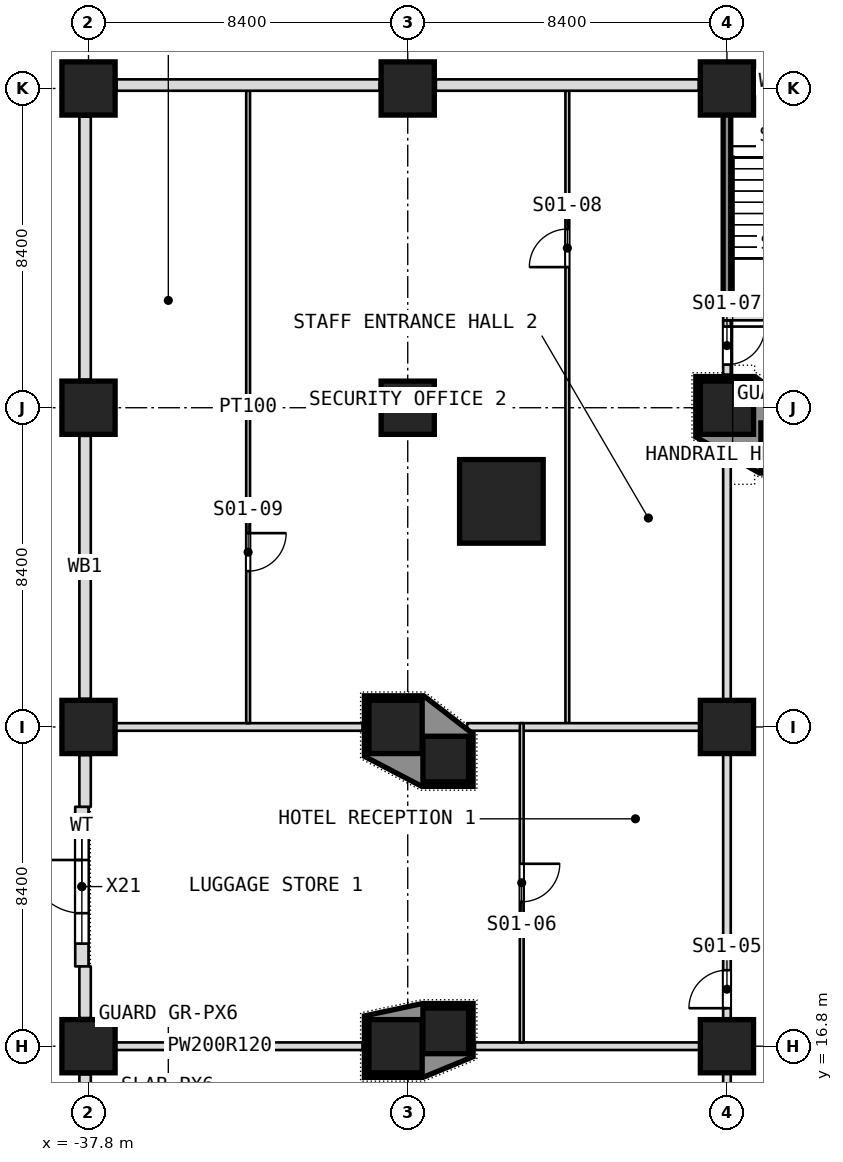
"""IFC4 building model, lengths in metres.
Left out: names, types, materials, properties, quantities, classifications, styles, units other than length and angle.
Written with IfcOpenShell. Run it as: python <this file> out.ifc"""

import sys

from ifc_helpers import new_model, si_unit, direction, frame, frame_2d, origin, origin_2d, place, context, subcontext, project, spatial, polyline, rectangle, outline, extrude, element, fill, save


model = new_model("IFC4")
c1 = context("Model", 3, precision=1e-05, world=origin(), true_north=direction((0.0, 1.0)))
c2 = subcontext(c1, "Body", "Model", "MODEL_VIEW")
j1 = project(units=[si_unit("LENGTHUNIT", "METRE"), si_unit("PLANEANGLEUNIT", "RADIAN")], contexts=[c1])
p1 = place(None, origin())
s1 = spatial("IfcSite", under=j1, at=p1, CompositionType="ELEMENT")
p2 = place(p1, origin())
s2 = spatial("IfcBuilding", under=s1, at=p2, CompositionType="ELEMENT")
p3 = place(p2, origin())
s3 = spatial("IfcBuildingStorey", under=s2, at=p3, CompositionType="ELEMENT", Elevation=0.0)
for number, where, z_axis, x_axis in (
    (1, (-37.8, 16.8, -0.3), (0.0, 0.0, 1.0), (1.0, 0.0, 0.0)),
    (2, (-29.72, 16.8, -0.3), (0.0, 0.0, 1.0), (1.0, 0.0, 0.0)),
    (3, (-21.0, 16.8, -0.3), (0.0, 0.0, 1.0), (1.0, 0.0, 0.0)),
    (4, (-37.8, 25.2, -0.3), (0.0, 0.0, 1.0), (1.0, 0.0, 0.0)),
    (5, (-29.72, 25.2, -0.3), (0.0, 0.0, 1.0), (1.0, 0.0, 0.0)),
    (6, (-21.0, 25.2, -0.3), (0.0, 0.0, 1.0), (1.0, 0.0, 0.0)),
    (7, (-37.8, 33.6, -0.3), (0.0, 0.0, 1.0), (1.0, 0.0, 0.0)),
    (8, (-29.4, 33.6, -0.3), (0.0, 0.0, 1.0), (1.0, 0.0, 0.0)),
    (9, (-21.0, 33.6, -0.3), (0.0, 0.0, 1.0), (1.0, 0.0, 0.0)),
    (10, (-37.8, 42.0, -0.3), (0.0, 0.0, 1.0), (1.0, 0.0, 0.0)),
    (11, (-29.4, 42.0, -0.3), (0.0, 0.0, 1.0), (1.0, 0.0, 0.0)),
    (12, (-21.0, 42.0, -0.3), (0.0, 0.0, 1.0), (1.0, 0.0, 0.0)),
):
    element("IfcColumn", number, at=place(p3, frame(where, z_axis=z_axis, x_axis=x_axis)), inside=s3, PredefinedType="COLUMN", context=c2, shape_type="SweptSolid", body=[
        extrude(rectangle(XDim=1.4, YDim=1.4, at=origin_2d()), origin(), (0.0, 0.0, 1.0), 8.3),
    ])
p4 = place(p3, frame((-26.936, 31.135, -0.3), z_axis=(0.0, 0.0, 1.0), x_axis=(1.0, 0.0, 0.0)))
e13 = element("IfcColumn", 13, at=p4, inside=s3, PredefinedType="COLUMN", context=c2, shape_type="SweptSolid", body=[
    extrude(rectangle(XDim=2.2, YDim=2.2, at=origin_2d()), origin(), (0.0, 0.0, 1.0), 8.3),
])
for number, where, z_axis, x_axis in (
    (14, (-28.4, 17.203, -0.3), (0.0, 0.0, 1.0), (1.0, 0.0, 0.0)),
    (15, (-28.4, 24.356, -0.3), (0.0, 0.0, 1.0), (1.0, 0.0, 0.0)),
    (16, (-19.507, 32.6, -0.3), (0.0, 0.0, 1.0), (1.0, 0.0, 0.0)),
):
    element("IfcColumn", number, at=place(p3, frame(where, z_axis=z_axis, x_axis=x_axis)), inside=s3, PredefinedType="COLUMN", context=c2, shape_type="SweptSolid", body=[
        extrude(rectangle(XDim=1.2, YDim=1.2, at=origin_2d()), origin(), (0.0, 0.0, 1.0), 8.3),
    ])
p5 = place(p3, frame((-38.1, 16.8, 0.0), z_axis=(0.0, 0.0, 1.0), x_axis=(1.0, 0.0, 0.0)))
e17 = element("IfcWall", 17, at=p5, inside=s3, PredefinedType="PARTITIONING", context=c2, shape_type="SweptSolid", body=[
    extrude(rectangle(XDim=7.51, YDim=0.2, at=frame_2d((3.755, 0.0))), origin(), (0.0, 0.0, 1.0), 7.68),
])
p6 = place(p3, frame((-27.63, 16.8, 0.0), z_axis=(0.0, 0.0, 1.0), x_axis=(1.0, 0.0, 0.0)))
e18 = element("IfcWall", 18, at=p6, inside=s3, PredefinedType="PARTITIONING", context=c2, shape_type="SweptSolid", body=[
    extrude(rectangle(XDim=6.53, YDim=0.2, at=frame_2d((3.265, 0.0))), origin(), (0.0, 0.0, 1.0), 7.68),
])
p7 = place(p3, frame((-21.0, 9.5, 0.0), z_axis=(0.0, 0.0, 1.0), x_axis=(0.0, 1.0, 0.0)))
e19 = element("IfcWall", 19, at=p7, inside=s3, PredefinedType="PARTITIONING", context=c2, shape_type="SweptSolid", body=[
    extrude(rectangle(XDim=22.788, YDim=0.2, at=frame_2d((11.394, 0.0))), origin(), (0.0, 0.0, 1.0), 7.68),
])
p8 = place(p7, frame((8.3, 0.0, 0.0)))
e20 = element("IfcOpeningElement", 20, at=p8, cuts=e19, PredefinedType="OPENING", context=c2, shape_type="SweptSolid", body=[
    extrude(rectangle(XDim=1.0, YDim=2.1, at=frame_2d((0.5, 1.05))), frame((0.0, 0.1, 0.0), z_axis=(0.0, -1.0, 0.0), x_axis=(1.0, 0.0, 0.0)), (0.0, 0.0, 1.0), 0.2),
])
p9 = place(p3, frame((-21.0, 34.47, 0.0), z_axis=(0.0, 0.0, 1.0), x_axis=(0.0, 1.0, 0.0)))
e21 = element("IfcWall", 21, at=p9, inside=s3, PredefinedType="PARTITIONING", context=c2, shape_type="SweptSolid", body=[
    extrude(rectangle(XDim=1.43, YDim=0.2, at=frame_2d((0.715, 0.0))), origin(), (0.0, 0.0, 1.0), 7.68),
])
p10 = place(p9, frame((0.265, 0.0, 0.0)))
e22 = element("IfcOpeningElement", 22, at=p10, cuts=e21, PredefinedType="OPENING", context=c2, shape_type="SweptSolid", body=[
    extrude(rectangle(XDim=1.0, YDim=2.1, at=frame_2d((0.5, 1.05))), frame((0.0, 0.1, 0.0), z_axis=(0.0, -1.0, 0.0), x_axis=(1.0, 0.0, 0.0)), (0.0, 0.0, 1.0), 0.2),
])
p11 = place(p3, frame((-21.0, 36.1, 0.0), z_axis=(0.0, 0.0, 1.0), x_axis=(0.0, 1.0, 0.0)))
e23 = element("IfcWall", 23, at=p11, inside=s3, PredefinedType="PARTITIONING", context=c2, shape_type="SweptSolid", body=[
    extrude(rectangle(XDim=6.2, YDim=0.2, at=frame_2d((3.1, 0.0))), origin(), (0.0, 0.0, 1.0), 7.68),
])
p12 = place(p3, frame((-25.2, 25.3, 0.0), z_axis=(0.0, 0.0, 1.0), x_axis=(0.0, 1.0, 0.0)))
e24 = element("IfcWall", 24, at=p12, inside=s3, PredefinedType="PARTITIONING", context=c2, shape_type="SweptSolid", body=[
    extrude(rectangle(XDim=16.64, YDim=0.1, at=frame_2d((8.32, 0.0))), origin(), (0.0, 0.0, 1.0), 7.68),
])
p13 = place(p12, frame((12.0, 0.0, 0.0)))
e25 = element("IfcOpeningElement", 25, at=p13, cuts=e24, PredefinedType="OPENING", context=c2, shape_type="SweptSolid", body=[
    extrude(rectangle(XDim=1.0, YDim=2.1, at=frame_2d((0.5, 1.05))), frame((0.0, 0.05, 0.0), z_axis=(0.0, -1.0, 0.0), x_axis=(1.0, 0.0, 0.0)), (0.0, 0.0, 1.0), 0.1),
])
p14 = place(p3, frame((-38.1, 25.2, 0.0), z_axis=(0.0, 0.0, 1.0), x_axis=(1.0, 0.0, 0.0)))
e26 = element("IfcWall", 26, at=p14, inside=s3, PredefinedType="PARTITIONING", context=c2, shape_type="SweptSolid", body=[
    extrude(rectangle(XDim=7.51, YDim=0.2, at=frame_2d((3.755, 0.0))), origin(), (0.0, 0.0, 1.0), 7.68),
])
p15 = place(p3, frame((-27.837, 25.2, 0.0), z_axis=(0.0, 0.0, 1.0), x_axis=(1.0, 0.0, 0.0)))
e27 = element("IfcWall", 27, at=p15, inside=s3, PredefinedType="PARTITIONING", context=c2, shape_type="SweptSolid", body=[
    extrude(rectangle(XDim=6.737, YDim=0.2, at=frame_2d((3.368, 0.0))), origin(), (0.0, 0.0, 1.0), 7.68),
])
p16 = place(p3, frame((-26.4, 16.9, 0.0), z_axis=(0.0, 0.0, 1.0), x_axis=(0.0, 1.0, 0.0)))
e28 = element("IfcWall", 28, at=p16, inside=s3, PredefinedType="PARTITIONING", context=c2, shape_type="SweptSolid", body=[
    extrude(rectangle(XDim=8.4, YDim=0.1, at=frame_2d((4.2, 0.0))), origin(), (0.0, 0.0, 1.0), 7.68),
])
p17 = place(p16, frame((3.7, 0.0, 0.0)))
e29 = element("IfcOpeningElement", 29, at=p17, cuts=e28, PredefinedType="OPENING", context=c2, shape_type="SweptSolid", body=[
    extrude(rectangle(XDim=1.0, YDim=2.1, at=frame_2d((0.5, 1.05))), frame((0.0, 0.05, 0.0), z_axis=(0.0, -1.0, 0.0), x_axis=(1.0, 0.0, 0.0)), (0.0, 0.0, 1.0), 0.1),
])
p18 = place(p3, frame((-33.6, 25.3, 0.0), z_axis=(0.0, 0.0, 1.0), x_axis=(0.0, 1.0, 0.0)))
e30 = element("IfcWall", 30, at=p18, inside=s3, PredefinedType="PARTITIONING", context=c2, shape_type="SweptSolid", body=[
    extrude(rectangle(XDim=16.64, YDim=0.1, at=frame_2d((8.32, 0.0))), origin(), (0.0, 0.0, 1.0), 7.68),
])
p19 = place(p18, frame((4.0, 0.0, 0.0)))
e31 = element("IfcOpeningElement", 31, at=p19, cuts=e30, PredefinedType="OPENING", context=c2, shape_type="SweptSolid", body=[
    extrude(rectangle(XDim=1.0, YDim=2.1, at=frame_2d((0.5, 1.05))), frame((0.0, 0.05, 0.0), z_axis=(0.0, -1.0, 0.0), x_axis=(1.0, 0.0, 0.0)), (0.0, 0.0, 1.0), 0.1),
])
p20 = place(p3, frame((-21.1, 36.0, 0.0), z_axis=(0.0, 0.0, 1.0), x_axis=(1.0, 0.0, 0.0)))
e32 = element("IfcWall", 32, at=p20, inside=s3, PredefinedType="PARTITIONING", context=c2, shape_type="SweptSolid", body=[
    extrude(rectangle(XDim=23.3, YDim=0.2, at=frame_2d((11.65, 0.0))), origin(), (0.0, 0.0, 1.0), 7.68),
])
p21 = place(p20, frame((1.6, 0.0, 0.0)))
e33 = element("IfcOpeningElement", 33, at=p21, cuts=e32, PredefinedType="OPENING", context=c2, shape_type="SweptSolid", body=[
    extrude(rectangle(XDim=1.2, YDim=2.1, at=frame_2d((0.6, 1.05))), frame((0.0, 0.1, 0.0), z_axis=(0.0, -1.0, 0.0), x_axis=(1.0, 0.0, 0.0)), (0.0, 0.0, 1.0), 0.2),
])
p22 = place(p20, frame((6.0, 0.0, 0.0)))
e34 = element("IfcOpeningElement", 34, at=p22, cuts=e32, PredefinedType="OPENING", context=c2, shape_type="SweptSolid", body=[
    extrude(rectangle(XDim=1.0, YDim=2.1, at=frame_2d((0.5, 1.05))), frame((0.0, 0.1, 0.0), z_axis=(0.0, -1.0, 0.0), x_axis=(1.0, 0.0, 0.0)), (0.0, 0.0, 1.0), 0.2),
])
p23 = place(p20, frame((13.15, 0.0, 0.0)))
e35 = element("IfcOpeningElement", 35, at=p23, cuts=e32, PredefinedType="OPENING", context=c2, shape_type="SweptSolid", body=[
    extrude(rectangle(XDim=1.0, YDim=2.1, at=frame_2d((0.5, 1.05))), frame((0.0, 0.1, 0.0), z_axis=(0.0, -1.0, 0.0), x_axis=(1.0, 0.0, 0.0)), (0.0, 0.0, 1.0), 0.2),
])
p24 = place(p20, frame((20.5, 0.0, 0.0)))
e36 = element("IfcOpeningElement", 36, at=p24, cuts=e32, PredefinedType="OPENING", context=c2, shape_type="SweptSolid", body=[
    extrude(rectangle(XDim=1.2, YDim=2.1, at=frame_2d((0.6, 1.05))), frame((0.0, 0.1, 0.0), z_axis=(0.0, -1.0, 0.0), x_axis=(1.0, 0.0, 0.0)), (0.0, 0.0, 1.0), 0.2),
])
p25 = place(p3, frame((-16.0, 42.175, 0.0), z_axis=(0.0, 0.0, 1.0), x_axis=(-1.0, 0.0, 0.0)))
e37 = element("IfcWall", 37, at=p25, inside=s3, PredefinedType="NOTDEFINED", context=c2, shape_type="SweptSolid", body=[
    extrude(rectangle(XDim=4.2, YDim=0.35, at=frame_2d((2.1, 0.0))), origin(), (0.0, 0.0, 1.0), 6.78),
])
p26 = place(p25, frame((1.4, 0.0, 0.0)))
e38 = element("IfcOpeningElement", 38, at=p26, cuts=e37, PredefinedType="OPENING", context=c2, shape_type="SweptSolid", body=[
    extrude(rectangle(XDim=1.4, YDim=2.2, at=frame_2d((0.7, 1.1))), frame((0.0, 0.175, 0.0), z_axis=(0.0, -1.0, 0.0), x_axis=(1.0, 0.0, 0.0)), (0.0, 0.0, 1.0), 0.35),
])
p27 = place(p25, frame((0.6, 0.0, 2.9)))
e39 = element("IfcOpeningElement", 39, at=p27, cuts=e37, PredefinedType="OPENING", context=c2, shape_type="SweptSolid", body=[
    extrude(rectangle(XDim=3.0, YDim=2.6, at=frame_2d((1.5, 1.3))), frame((0.0, 0.175, 0.0), z_axis=(0.0, -1.0, 0.0), x_axis=(1.0, 0.0, 0.0)), (0.0, 0.0, 1.0), 0.35),
])
p28 = place(p3, frame((-21.74, 42.09, 0.0), z_axis=(0.0, 0.0, 1.0), x_axis=(-1.0, 0.0, 0.0)))
e40 = element("IfcWall", 40, at=p28, inside=s3, PredefinedType="NOTDEFINED", context=c2, shape_type="SweptSolid", body=[
    extrude(rectangle(XDim=6.92, YDim=0.3, at=frame_2d((3.46, 0.0))), origin(), (0.0, 0.0, 1.0), 6.78),
])
p29 = place(p3, frame((-30.14, 42.09, 0.0), z_axis=(0.0, 0.0, 1.0), x_axis=(-1.0, 0.0, 0.0)))
e41 = element("IfcWall", 41, at=p29, inside=s3, PredefinedType="NOTDEFINED", context=c2, shape_type="SweptSolid", body=[
    extrude(rectangle(XDim=6.92, YDim=0.3, at=frame_2d((3.46, 0.0))), origin(), (0.0, 0.0, 1.0), 6.78),
])
p30 = place(p3, frame((-37.975, 23.1, 0.0), z_axis=(0.0, 0.0, 1.0), x_axis=(0.0, -1.0, 0.0)))
e42 = element("IfcWall", 42, at=p30, inside=s3, PredefinedType="NOTDEFINED", context=c2, shape_type="SweptSolid", body=[
    extrude(rectangle(XDim=4.2, YDim=0.35, at=frame_2d((2.1, 0.0))), origin(), (0.0, 0.0, 1.0), 6.78),
])
p31 = place(p30, frame((1.4, 0.0, 0.0)))
e43 = element("IfcOpeningElement", 43, at=p31, cuts=e42, PredefinedType="OPENING", context=c2, shape_type="SweptSolid", body=[
    extrude(rectangle(XDim=1.4, YDim=2.2, at=frame_2d((0.7, 1.1))), frame((0.0, 0.175, 0.0), z_axis=(0.0, -1.0, 0.0), x_axis=(1.0, 0.0, 0.0)), (0.0, 0.0, 1.0), 0.35),
])
p32 = place(p30, frame((0.6, 0.0, 2.9)))
e44 = element("IfcOpeningElement", 44, at=p32, cuts=e42, PredefinedType="OPENING", context=c2, shape_type="SweptSolid", body=[
    extrude(rectangle(XDim=3.0, YDim=2.6, at=frame_2d((1.5, 1.3))), frame((0.0, 0.175, 0.0), z_axis=(0.0, -1.0, 0.0), x_axis=(1.0, 0.0, 0.0)), (0.0, 0.0, 1.0), 0.35),
])
p33 = place(p3, frame((-37.89, 41.26, 0.0), z_axis=(0.0, 0.0, 1.0), x_axis=(0.0, -1.0, 0.0)))
e45 = element("IfcWall", 45, at=p33, inside=s3, PredefinedType="NOTDEFINED", context=c2, shape_type="SweptSolid", body=[
    extrude(rectangle(XDim=6.92, YDim=0.3, at=frame_2d((3.46, 0.0))), origin(), (0.0, 0.0, 1.0), 6.78),
])
p34 = place(p3, frame((-37.89, 32.86, 0.0), z_axis=(0.0, 0.0, 1.0), x_axis=(0.0, -1.0, 0.0)))
e46 = element("IfcWall", 46, at=p34, inside=s3, PredefinedType="NOTDEFINED", context=c2, shape_type="SweptSolid", body=[
    extrude(rectangle(XDim=6.92, YDim=0.3, at=frame_2d((3.46, 0.0))), origin(), (0.0, 0.0, 1.0), 6.78),
])
for number, where, z_axis, x_axis in (
    (47, (-37.89, 24.46, 0.0), (0.0, 0.0, 1.0), (0.0, -1.0, 0.0)),
    (48, (-37.89, 18.9, 0.0), (0.0, 0.0, 1.0), (0.0, -1.0, 0.0)),
):
    element("IfcWall", number, at=place(p3, frame(where, z_axis=z_axis, x_axis=x_axis)), inside=s3, PredefinedType="NOTDEFINED", context=c2, shape_type="SweptSolid", body=[
        extrude(rectangle(XDim=1.36, YDim=0.3, at=frame_2d((0.68, 0.0))), origin(), (0.0, 0.0, 1.0), 6.78),
    ])
p35 = place(p3, frame((-37.89, 16.06, 0.0), z_axis=(0.0, 0.0, 1.0), x_axis=(0.0, -1.0, 0.0)))
e49 = element("IfcWall", 49, at=p35, inside=s3, PredefinedType="NOTDEFINED", context=c2, shape_type="SweptSolid", body=[
    extrude(rectangle(XDim=4.36, YDim=0.3, at=frame_2d((2.18, 0.0))), origin(), (0.0, 0.0, 1.0), 8.0),
])
p36 = place(p3, origin())
e50 = element("IfcWall", 50, at=p36, inside=s3, PredefinedType="SOLIDWALL", context=c2, shape_type="SweptSolid", body=[
    extrude(outline(polyline([(-30.54, 17.597), (-29.013, 17.923), (-27.68, 17.923), (-27.68, 16.523), (-28.996, 15.98), (-30.54, 15.98), (-30.54, 17.597)]), holes=[polyline([(-29.0, 16.603), (-27.8, 16.603), (-27.8, 17.803), (-29.0, 17.803), (-29.0, 16.603)]), polyline([(-30.42, 16.1), (-29.02, 16.1), (-29.02, 17.5), (-30.42, 17.5), (-30.42, 16.1)])]), origin(), (0.0, 0.0, 1.0), 8.0),
])
p37 = place(p3, origin())
e51 = element("IfcWall", 51, at=p37, inside=s3, PredefinedType="SOLIDWALL", context=c2, shape_type="SweptSolid", body=[
    extrude(outline(polyline([(-30.54, 24.427), (-30.54, 26.02), (-28.979, 26.02), (-27.68, 25.015), (-27.68, 23.636), (-29.03, 23.636), (-30.54, 24.427)]), holes=[polyline([(-29.0, 23.756), (-27.8, 23.756), (-27.8, 24.956), (-29.0, 24.956), (-29.0, 23.756)]), polyline([(-30.42, 24.5), (-29.02, 24.5), (-29.02, 25.9), (-30.42, 25.9), (-30.42, 24.5)])]), origin(), (0.0, 0.0, 1.0), 8.0),
])
p38 = place(p3, origin())
e52 = element("IfcWall", 52, at=p38, inside=s3, PredefinedType="SOLIDWALL", context=c2, shape_type="SweptSolid", body=[
    extrude(outline(polyline([(-21.82, 34.42), (-20.258, 34.42), (-18.787, 33.258), (-18.787, 31.88), (-20.138, 31.88), (-21.82, 32.83), (-21.82, 34.42)]), holes=[polyline([(-18.907, 32.0), (-18.907, 33.2), (-20.107, 33.2), (-20.107, 32.0), (-18.907, 32.0)]), polyline([(-20.3, 32.9), (-20.3, 34.3), (-21.7, 34.3), (-21.7, 32.9), (-20.3, 32.9)])]), origin(), (0.0, 0.0, 1.0), 8.0),
])
p39 = place(p8, origin())
e53 = element("IfcDoor", 53, at=p39, inside=s3, OperationType="SINGLE_SWING_RIGHT", PredefinedType="DOOR", context=c2, shape_type="SweptSolid", body=[
    extrude(rectangle(XDim=1.0, YDim=2.1, at=frame_2d((0.5, 1.05))), frame((0.0, 0.025, 0.0), z_axis=(0.0, -1.0, 0.0), x_axis=(1.0, 0.0, 0.0)), (0.0, 0.0, 1.0), 0.05),
])
fill(e20, e53)
p40 = place(p10, origin())
e54 = element("IfcDoor", 54, at=p40, inside=s3, OperationType="SINGLE_SWING_LEFT", PredefinedType="DOOR", context=c2, shape_type="SweptSolid", body=[
    extrude(rectangle(XDim=1.0, YDim=2.1, at=frame_2d((0.5, 1.05))), frame((0.0, 0.025, 0.0), z_axis=(0.0, -1.0, 0.0), x_axis=(1.0, 0.0, 0.0)), (0.0, 0.0, 1.0), 0.05),
])
fill(e22, e54)
p41 = place(p13, origin())
e55 = element("IfcDoor", 55, at=p41, inside=s3, OperationType="SINGLE_SWING_LEFT", PredefinedType="DOOR", context=c2, shape_type="SweptSolid", body=[
    extrude(rectangle(XDim=1.0, YDim=2.1, at=frame_2d((0.5, 1.05))), frame((0.0, 0.025, 0.0), z_axis=(0.0, -1.0, 0.0), x_axis=(1.0, 0.0, 0.0)), (0.0, 0.0, 1.0), 0.05),
])
fill(e25, e55)
p42 = place(p17, origin())
e56 = element("IfcDoor", 56, at=p42, inside=s3, OperationType="SINGLE_SWING_RIGHT", PredefinedType="DOOR", context=c2, shape_type="SweptSolid", body=[
    extrude(rectangle(XDim=1.0, YDim=2.1, at=frame_2d((0.5, 1.05))), frame((0.0, 0.025, 0.0), z_axis=(0.0, -1.0, 0.0), x_axis=(1.0, 0.0, 0.0)), (0.0, 0.0, 1.0), 0.05),
])
fill(e29, e56)
p43 = place(p19, origin())
e57 = element("IfcDoor", 57, at=p43, inside=s3, OperationType="SINGLE_SWING_LEFT", PredefinedType="DOOR", context=c2, shape_type="SweptSolid", body=[
    extrude(rectangle(XDim=1.0, YDim=2.1, at=frame_2d((0.5, 1.05))), frame((0.0, 0.025, 0.0), z_axis=(0.0, -1.0, 0.0), x_axis=(1.0, 0.0, 0.0)), (0.0, 0.0, 1.0), 0.05),
])
fill(e31, e57)
p44 = place(p31, frame((1.4, 0.0, 0.0), z_axis=(0.0, 0.0, 1.0), x_axis=(-1.0, 0.0, 0.0)))
e58 = element("IfcDoor", 58, at=p44, inside=s3, OperationType="SINGLE_SWING_LEFT", PredefinedType="DOOR", context=c2, shape_type="SweptSolid", body=[
    extrude(rectangle(XDim=1.4, YDim=2.2, at=frame_2d((0.7, 1.1))), frame((0.0, 0.025, 0.0), z_axis=(0.0, -1.0, 0.0), x_axis=(1.0, 0.0, 0.0)), (0.0, 0.0, 1.0), 0.05),
])
fill(e43, e58)
p45 = place(p32, origin())
e59 = element("IfcWindow", 59, at=p45, inside=s3, PartitioningType="SINGLE_PANEL", PredefinedType="WINDOW", context=c2, shape_type="SweptSolid", body=[
    extrude(rectangle(XDim=3.0, YDim=2.6, at=frame_2d((1.5, 1.3))), frame((0.0, 0.03, 0.0), z_axis=(0.0, -1.0, 0.0), x_axis=(1.0, 0.0, 0.0)), (0.0, 0.0, 1.0), 0.06),
])
fill(e44, e59)
save(model, sys.argv[1])
